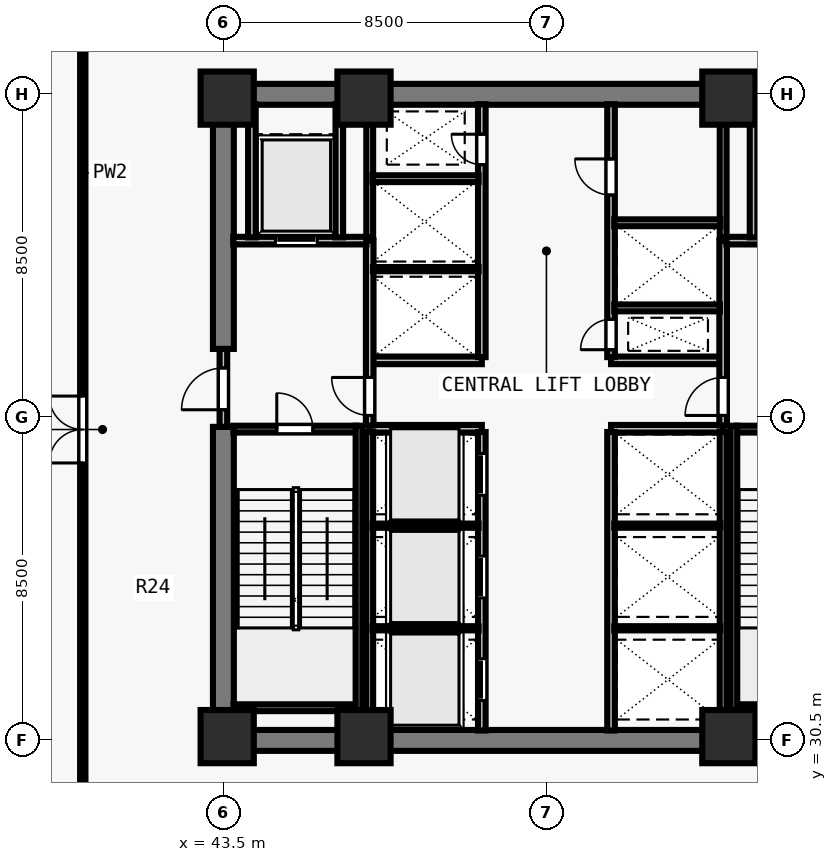
"""IFC4 building model, lengths in metres.
Left out: names, types, materials, properties, quantities, classifications, styles, units other than length and angle.
Written with IfcOpenShell. Run it as: python <this file> out.ifc"""

import sys

from ifc_helpers import new_model, si_unit, direction, frame, frame_2d, origin, origin_2d, place, context, subcontext, project, spatial, rectangle, extrude, element, fill, save


model = new_model("IFC4")
c1 = context("Model", 3, precision=1e-05, world=origin(), true_north=direction((0.0, 1.0)))
c2 = subcontext(c1, "Body", "Model", "MODEL_VIEW")
j1 = project(units=[si_unit("LENGTHUNIT", "METRE"), si_unit("PLANEANGLEUNIT", "RADIAN")], contexts=[c1])
p1 = place(None, origin())
s1 = spatial("IfcSite", under=j1, at=p1, CompositionType="ELEMENT")
p2 = place(p1, origin())
s2 = spatial("IfcBuilding", under=s1, at=p2, CompositionType="ELEMENT")
p3 = place(p2, frame((0.0, 0.0, 5.0)))
s3 = spatial("IfcBuildingStorey", under=s2, at=p3, CompositionType="ELEMENT", Elevation=5.0)
for number, where, z_axis, x_axis in (
    (1, (43.6, 30.6, 0.0), (0.0, 0.0, 1.0), (1.0, 0.0, 0.0)),
    (2, (47.2, 30.6, 0.0), (0.0, 0.0, 1.0), (1.0, 0.0, 0.0)),
    (3, (56.8, 30.6, 0.0), (0.0, 0.0, 1.0), (1.0, 0.0, 0.0)),
    (4, (43.6, 47.4, 0.0), (0.0, 0.0, 1.0), (1.0, 0.0, 0.0)),
    (5, (47.2, 47.4, 0.0), (0.0, 0.0, 1.0), (1.0, 0.0, 0.0)),
    (6, (56.8, 47.4, 0.0), (0.0, 0.0, 1.0), (1.0, 0.0, 0.0)),
):
    element("IfcColumn", number, at=place(p3, frame(where, z_axis=z_axis, x_axis=x_axis)), inside=s3, PredefinedType="COLUMN", context=c2, shape_type="SweptSolid", body=[
        extrude(rectangle(XDim=1.4, YDim=1.4, at=origin_2d()), origin(), (0.0, 0.0, 1.0), 5.0),
    ])
for number, where, z_axis, x_axis in (
    (7, (43.225, 30.5, 0.0), (0.0, 0.0, 1.0), (1.0, 0.0, 0.0)),
    (8, (43.225, 47.5, 0.0), (0.0, 0.0, 1.0), (1.0, 0.0, 0.0)),
):
    element("IfcWall", number, at=place(p3, frame(where, z_axis=z_axis, x_axis=x_axis)), inside=s3, PredefinedType="SHEAR", context=c2, shape_type="SweptSolid", body=[
        extrude(rectangle(XDim=17.55, YDim=0.55, at=frame_2d((8.775, 0.0))), origin(), (0.0, 0.0, 1.0), 4.72),
    ])
p4 = place(p3, frame((43.5, 30.765, 0.0), z_axis=(0.0, 0.0, 1.0), x_axis=(0.0, 1.0, 0.0)))
e9 = element("IfcWall", 9, at=p4, inside=s3, PredefinedType="SHEAR", context=c2, shape_type="SweptSolid", body=[
    extrude(rectangle(XDim=7.985, YDim=0.55, at=frame_2d((3.993, 0.0))), origin(), (0.0, 0.0, 1.0), 4.72),
])
p5 = place(p3, frame((43.5, 40.8, 0.0), z_axis=(0.0, 0.0, 1.0), x_axis=(0.0, 1.0, 0.0)))
e10 = element("IfcWall", 10, at=p5, inside=s3, PredefinedType="SHEAR", context=c2, shape_type="SweptSolid", body=[
    extrude(rectangle(XDim=6.435, YDim=0.55, at=frame_2d((3.218, 0.0))), origin(), (0.0, 0.0, 1.0), 4.72),
])
for number, where, z_axis, x_axis in (
    (11, (47.35, 38.7, 0.0), (0.0, 0.0, 1.0), (1.0, 0.0, 0.0)),
    (12, (47.35, 40.5, 0.0), (0.0, 0.0, 1.0), (1.0, 0.0, 0.0)),
    (13, (53.7, 38.7, 0.0), (0.0, 0.0, 1.0), (1.0, 0.0, 0.0)),
    (14, (53.7, 40.5, 0.0), (0.0, 0.0, 1.0), (1.0, 0.0, 0.0)),
):
    element("IfcWall", number, at=place(p3, frame(where, z_axis=z_axis, x_axis=x_axis)), inside=s3, PredefinedType="SOLIDWALL", context=c2, shape_type="SweptSolid", body=[
        extrude(rectangle(XDim=2.95, YDim=0.2, at=frame_2d((1.475, 0.0))), origin(), (0.0, 0.0, 1.0), 4.72),
    ])
p6 = place(p3, frame((50.3, 30.76, 0.0), z_axis=(0.0, 0.0, 1.0), x_axis=(0.0, 1.0, 0.0)))
e15 = element("IfcWall", 15, at=p6, inside=s3, PredefinedType="SOLIDWALL", context=c2, shape_type="SweptSolid", body=[
    extrude(rectangle(XDim=7.855, YDim=0.2, at=frame_2d((3.927, 0.0))), origin(), (0.0, 0.0, 1.0), 4.72),
])
p7 = place(p6, frame((0.79, 0.0, 0.0)))
e16 = element("IfcOpeningElement", 16, at=p7, cuts=e15, PredefinedType="OPENING", context=c2, shape_type="SweptSolid", body=[
    extrude(rectangle(XDim=1.1, YDim=2.2, at=frame_2d((0.55, 1.1))), frame((0.0, 0.11, 0.0), z_axis=(0.0, -1.0, 0.0), x_axis=(1.0, 0.0, 0.0)), (0.0, 0.0, 1.0), 0.22),
])
p8 = place(p6, frame((3.49, 0.0, 0.0)))
e17 = element("IfcOpeningElement", 17, at=p8, cuts=e15, PredefinedType="OPENING", context=c2, shape_type="SweptSolid", body=[
    extrude(rectangle(XDim=1.1, YDim=2.2, at=frame_2d((0.55, 1.1))), frame((0.0, 0.11, 0.0), z_axis=(0.0, -1.0, 0.0), x_axis=(1.0, 0.0, 0.0)), (0.0, 0.0, 1.0), 0.22),
])
p9 = place(p6, frame((6.19, 0.0, 0.0)))
e18 = element("IfcOpeningElement", 18, at=p9, cuts=e15, PredefinedType="OPENING", context=c2, shape_type="SweptSolid", body=[
    extrude(rectangle(XDim=1.1, YDim=2.2, at=frame_2d((0.55, 1.1))), frame((0.0, 0.11, 0.0), z_axis=(0.0, -1.0, 0.0), x_axis=(1.0, 0.0, 0.0)), (0.0, 0.0, 1.0), 0.22),
])
p10 = place(p3, frame((53.7, 30.76, 0.0), z_axis=(0.0, 0.0, 1.0), x_axis=(0.0, 1.0, 0.0)))
e19 = element("IfcWall", 19, at=p10, inside=s3, PredefinedType="SOLIDWALL", context=c2, shape_type="SweptSolid", body=[
    extrude(rectangle(XDim=7.855, YDim=0.2, at=frame_2d((3.927, 0.0))), origin(), (0.0, 0.0, 1.0), 4.72),
])
p11 = place(p3, frame((50.3, 40.585, 0.0), z_axis=(0.0, 0.0, 1.0), x_axis=(0.0, 1.0, 0.0)))
e20 = element("IfcWall", 20, at=p11, inside=s3, PredefinedType="SOLIDWALL", context=c2, shape_type="SweptSolid", body=[
    extrude(rectangle(XDim=6.655, YDim=0.2, at=frame_2d((3.328, 0.0))), origin(), (0.0, 0.0, 1.0), 4.72),
])
p12 = place(p11, frame((5.065, 0.0, 0.0)))
e21 = element("IfcOpeningElement", 21, at=p12, cuts=e20, PredefinedType="OPENING", context=c2, shape_type="SweptSolid", body=[
    extrude(rectangle(XDim=0.8, YDim=2.08, at=frame_2d((0.4, 1.04))), frame((0.0, 0.11, 0.0), z_axis=(0.0, -1.0, 0.0), x_axis=(1.0, 0.0, 0.0)), (0.0, 0.0, 1.0), 0.22),
])
p13 = place(p3, frame((53.7, 40.585, 0.0), z_axis=(0.0, 0.0, 1.0), x_axis=(0.0, 1.0, 0.0)))
e22 = element("IfcWall", 22, at=p13, inside=s3, PredefinedType="SOLIDWALL", context=c2, shape_type="SweptSolid", body=[
    extrude(rectangle(XDim=6.655, YDim=0.2, at=frame_2d((3.328, 0.0))), origin(), (0.0, 0.0, 1.0), 4.72),
])
p14 = place(p13, frame((0.195, 0.0, 0.0)))
e23 = element("IfcOpeningElement", 23, at=p14, cuts=e22, PredefinedType="OPENING", context=c2, shape_type="SweptSolid", body=[
    extrude(rectangle(XDim=0.8, YDim=2.08, at=frame_2d((0.4, 1.04))), frame((0.0, 0.11, 0.0), z_axis=(0.0, -1.0, 0.0), x_axis=(1.0, 0.0, 0.0)), (0.0, 0.0, 1.0), 0.22),
])
p15 = place(p13, frame((4.265, 0.0, 0.0)))
e24 = element("IfcOpeningElement", 24, at=p15, cuts=e22, PredefinedType="OPENING", context=c2, shape_type="SweptSolid", body=[
    extrude(rectangle(XDim=0.95, YDim=2.12, at=frame_2d((0.475, 1.06))), frame((0.0, 0.11, 0.0), z_axis=(0.0, -1.0, 0.0), x_axis=(1.0, 0.0, 0.0)), (0.0, 0.0, 1.0), 0.22),
])
p16 = place(p3, frame((43.5, 38.75, 0.0), z_axis=(0.0, 0.0, 1.0), x_axis=(0.0, 1.0, 0.0)))
e25 = element("IfcWall", 25, at=p16, inside=s3, PredefinedType="SOLIDWALL", context=c2, shape_type="SweptSolid", body=[
    extrude(rectangle(XDim=2.05, YDim=0.2, at=frame_2d((1.025, 0.0))), origin(), (0.0, 0.0, 1.0), 4.72),
])
p17 = place(p16, frame((0.45, 0.0, 0.0)))
e26 = element("IfcOpeningElement", 26, at=p17, cuts=e25, PredefinedType="OPENING", context=c2, shape_type="SweptSolid", body=[
    extrude(rectangle(XDim=1.1, YDim=2.15, at=frame_2d((0.55, 1.075))), frame((0.0, 0.11, 0.0), z_axis=(0.0, -1.0, 0.0), x_axis=(1.0, 0.0, 0.0)), (0.0, 0.0, 1.0), 0.22),
])
p18 = place(p3, frame((47.35, 38.785, 0.0), z_axis=(0.0, 0.0, 1.0), x_axis=(0.0, 1.0, 0.0)))
e27 = element("IfcWall", 27, at=p18, inside=s3, PredefinedType="SOLIDWALL", context=c2, shape_type="SweptSolid", body=[
    extrude(rectangle(XDim=4.865, YDim=0.2, at=frame_2d((2.433, 0.0))), origin(), (0.0, 0.0, 1.0), 4.72),
])
p19 = place(p18, frame((0.265, 0.0, 0.0)))
e28 = element("IfcOpeningElement", 28, at=p19, cuts=e27, PredefinedType="OPENING", context=c2, shape_type="SweptSolid", body=[
    extrude(rectangle(XDim=1.0, YDim=2.15, at=frame_2d((0.5, 1.075))), frame((0.0, 0.11, 0.0), z_axis=(0.0, -1.0, 0.0), x_axis=(1.0, 0.0, 0.0)), (0.0, 0.0, 1.0), 0.22),
])
p20 = place(p3, frame((43.76, 43.65, 0.0), z_axis=(0.0, 0.0, 1.0), x_axis=(1.0, 0.0, 0.0)))
e29 = element("IfcWall", 29, at=p20, inside=s3, PredefinedType="SOLIDWALL", context=c2, shape_type="SweptSolid", body=[
    extrude(rectangle(XDim=3.505, YDim=0.2, at=frame_2d((1.752, 0.0))), origin(), (0.0, 0.0, 1.0), 4.72),
])
p21 = place(p20, frame((1.11, 0.0, 0.0)))
e30 = element("IfcOpeningElement", 30, at=p21, cuts=e29, PredefinedType="OPENING", context=c2, shape_type="SweptSolid", body=[
    extrude(rectangle(XDim=1.1, YDim=2.2, at=frame_2d((0.55, 1.1))), frame((0.0, 0.11, 0.0), z_axis=(0.0, -1.0, 0.0), x_axis=(1.0, 0.0, 0.0)), (0.0, 0.0, 1.0), 0.22),
])
for number, where, z_axis, x_axis in (
    (31, (46.55, 43.735, 0.0), (0.0, 0.0, 1.0), (0.0, 1.0, 0.0)),
    (32, (44.25, 43.735, 0.0), (0.0, 0.0, 1.0), (0.0, 1.0, 0.0)),
):
    element("IfcWall", number, at=place(p3, frame(where, z_axis=z_axis, x_axis=x_axis)), inside=s3, PredefinedType="SOLIDWALL", context=c2, shape_type="SweptSolid", body=[
        extrude(rectangle(XDim=3.505, YDim=0.2, at=frame_2d((1.752, 0.0))), origin(), (0.0, 0.0, 1.0), 4.72),
    ])
p22 = place(p3, frame((56.65, 38.785, 0.0), z_axis=(0.0, 0.0, 1.0), x_axis=(0.0, 1.0, 0.0)))
e33 = element("IfcWall", 33, at=p22, inside=s3, PredefinedType="SOLIDWALL", context=c2, shape_type="SweptSolid", body=[
    extrude(rectangle(XDim=4.865, YDim=0.2, at=frame_2d((2.433, 0.0))), origin(), (0.0, 0.0, 1.0), 4.72),
])
p23 = place(p22, frame((0.265, 0.0, 0.0)))
e34 = element("IfcOpeningElement", 34, at=p23, cuts=e33, PredefinedType="OPENING", context=c2, shape_type="SweptSolid", body=[
    extrude(rectangle(XDim=1.0, YDim=2.15, at=frame_2d((0.5, 1.075))), frame((0.0, 0.11, 0.0), z_axis=(0.0, -1.0, 0.0), x_axis=(1.0, 0.0, 0.0)), (0.0, 0.0, 1.0), 0.22),
])
p24 = place(p3, frame((56.735, 43.65, 0.0), z_axis=(0.0, 0.0, 1.0), x_axis=(1.0, 0.0, 0.0)))
e35 = element("IfcWall", 35, at=p24, inside=s3, PredefinedType="SOLIDWALL", context=c2, shape_type="SweptSolid", body=[
    extrude(rectangle(XDim=3.505, YDim=0.2, at=frame_2d((1.752, 0.0))), origin(), (0.0, 0.0, 1.0), 4.72),
])
p25 = place(p24, frame((1.295, 0.0, 0.0)))
e36 = element("IfcOpeningElement", 36, at=p25, cuts=e35, PredefinedType="OPENING", context=c2, shape_type="SweptSolid", body=[
    extrude(rectangle(XDim=1.1, YDim=2.2, at=frame_2d((0.55, 1.1))), frame((0.0, 0.11, 0.0), z_axis=(0.0, -1.0, 0.0), x_axis=(1.0, 0.0, 0.0)), (0.0, 0.0, 1.0), 0.22),
])
p26 = place(p3, frame((57.45, 43.735, 0.0), z_axis=(0.0, 0.0, 1.0), x_axis=(0.0, 1.0, 0.0)))
e37 = element("IfcWall", 37, at=p26, inside=s3, PredefinedType="SOLIDWALL", context=c2, shape_type="SweptSolid", body=[
    extrude(rectangle(XDim=3.505, YDim=0.2, at=frame_2d((1.752, 0.0))), origin(), (0.0, 0.0, 1.0), 4.72),
])
p27 = place(p3, frame((47.35, 30.76, 0.0), z_axis=(0.0, 0.0, 1.0), x_axis=(0.0, 1.0, 0.0)))
e38 = element("IfcWall", 38, at=p27, inside=s3, PredefinedType="SOLIDWALL", context=c2, shape_type="SweptSolid", body=[
    extrude(rectangle(XDim=7.855, YDim=0.18, at=frame_2d((3.927, 0.0))), origin(), (0.0, 0.0, 1.0), 4.72),
])
for number, where, z_axis, x_axis in (
    (39, (47.425, 33.45, 0.0), (0.0, 0.0, 1.0), (1.0, 0.0, 0.0)),
    (40, (47.425, 36.15, 0.0), (0.0, 0.0, 1.0), (1.0, 0.0, 0.0)),
):
    element("IfcWall", number, at=place(p3, frame(where, z_axis=z_axis, x_axis=x_axis)), inside=s3, PredefinedType="PARTITIONING", context=c2, shape_type="SweptSolid", body=[
        extrude(rectangle(XDim=2.79, YDim=0.11, at=frame_2d((1.395, 0.0))), origin(), (0.0, 0.0, 1.0), 4.72),
    ])
p28 = place(p3, frame((56.65, 30.76, 0.0), z_axis=(0.0, 0.0, 1.0), x_axis=(0.0, 1.0, 0.0)))
e41 = element("IfcWall", 41, at=p28, inside=s3, PredefinedType="SOLIDWALL", context=c2, shape_type="SweptSolid", body=[
    extrude(rectangle(XDim=7.855, YDim=0.18, at=frame_2d((3.927, 0.0))), origin(), (0.0, 0.0, 1.0), 4.72),
])
for number, where, z_axis, x_axis in (
    (42, (53.785, 33.45, 0.0), (0.0, 0.0, 1.0), (1.0, 0.0, 0.0)),
    (43, (53.785, 36.15, 0.0), (0.0, 0.0, 1.0), (1.0, 0.0, 0.0)),
):
    element("IfcWall", number, at=place(p3, frame(where, z_axis=z_axis, x_axis=x_axis)), inside=s3, PredefinedType="PARTITIONING", context=c2, shape_type="SweptSolid", body=[
        extrude(rectangle(XDim=2.79, YDim=0.11, at=frame_2d((1.395, 0.0))), origin(), (0.0, 0.0, 1.0), 4.72),
    ])
p29 = place(p3, frame((47.35, 43.735, 0.0), z_axis=(0.0, 0.0, 1.0), x_axis=(0.0, 1.0, 0.0)))
e44 = element("IfcWall", 44, at=p29, inside=s3, PredefinedType="SOLIDWALL", context=c2, shape_type="SweptSolid", body=[
    extrude(rectangle(XDim=3.505, YDim=0.18, at=frame_2d((1.752, 0.0))), origin(), (0.0, 0.0, 1.0), 4.72),
])
p30 = place(p3, frame((47.435, 42.9, 0.0), z_axis=(0.0, 0.0, 1.0), x_axis=(1.0, 0.0, 0.0)))
e45 = element("IfcWall", 45, at=p30, inside=s3, PredefinedType="PARTITIONING", context=c2, shape_type="SweptSolid", body=[
    extrude(rectangle(XDim=2.78, YDim=0.11, at=frame_2d((1.39, 0.0))), origin(), (0.0, 0.0, 1.0), 4.72),
])
p31 = place(p3, frame((47.425, 45.28, 0.0), z_axis=(0.0, 0.0, 1.0), x_axis=(1.0, 0.0, 0.0)))
e46 = element("IfcWall", 46, at=p31, inside=s3, PredefinedType="SOLIDWALL", context=c2, shape_type="SweptSolid", body=[
    extrude(rectangle(XDim=2.79, YDim=0.18, at=frame_2d((1.395, 0.0))), origin(), (0.0, 0.0, 1.0), 4.72),
])
p32 = place(p3, frame((56.65, 43.735, 0.0), z_axis=(0.0, 0.0, 1.0), x_axis=(0.0, 1.0, 0.0)))
e47 = element("IfcWall", 47, at=p32, inside=s3, PredefinedType="SOLIDWALL", context=c2, shape_type="SweptSolid", body=[
    extrude(rectangle(XDim=3.505, YDim=0.18, at=frame_2d((1.752, 0.0))), origin(), (0.0, 0.0, 1.0), 4.72),
])
p33 = place(p3, frame((53.785, 41.88, 0.0), z_axis=(0.0, 0.0, 1.0), x_axis=(1.0, 0.0, 0.0)))
e48 = element("IfcWall", 48, at=p33, inside=s3, PredefinedType="SOLIDWALL", context=c2, shape_type="SweptSolid", body=[
    extrude(rectangle(XDim=2.78, YDim=0.18, at=frame_2d((1.39, 0.0))), origin(), (0.0, 0.0, 1.0), 4.72),
])
p34 = place(p3, frame((53.785, 44.12, 0.0), z_axis=(0.0, 0.0, 1.0), x_axis=(1.0, 0.0, 0.0)))
e49 = element("IfcWall", 49, at=p34, inside=s3, PredefinedType="SOLIDWALL", context=c2, shape_type="SweptSolid", body=[
    extrude(rectangle(XDim=2.79, YDim=0.18, at=frame_2d((1.395, 0.0))), origin(), (0.0, 0.0, 1.0), 4.72),
])
p35 = place(p3, frame((39.8, 26.855, 0.0), z_axis=(0.0, 0.0, 1.0), x_axis=(0.0, 1.0, 0.0)))
e50 = element("IfcWall", 50, at=p35, inside=s3, PredefinedType="PARTITIONING", context=c2, shape_type="SweptSolid", body=[
    extrude(rectangle(XDim=24.29, YDim=0.14, at=frame_2d((12.145, 0.0))), origin(), (0.0, 0.0, 1.0), 4.72),
])
p36 = place(p35, frame((10.945, 0.0, 0.0)))
e51 = element("IfcOpeningElement", 51, at=p36, cuts=e50, PredefinedType="OPENING", context=c2, shape_type="SweptSolid", body=[
    extrude(rectangle(XDim=1.76, YDim=2.2, at=frame_2d((0.88, 1.1))), frame((0.0, 0.08, 0.0), z_axis=(0.0, -1.0, 0.0), x_axis=(1.0, 0.0, 0.0)), (0.0, 0.0, 1.0), 0.16),
])
p37 = place(p3, frame((43.765, 38.69, 0.0), z_axis=(0.0, 0.0, 1.0), x_axis=(1.0, 0.0, 0.0)))
e52 = element("IfcWall", 52, at=p37, inside=s3, PredefinedType="SOLIDWALL", context=c2, shape_type="SweptSolid", body=[
    extrude(rectangle(XDim=3.23, YDim=0.18, at=frame_2d((1.615, 0.0))), origin(), (0.0, 0.0, 1.0), 4.72),
])
p38 = place(p37, frame((1.14, 0.0, 0.0)))
e53 = element("IfcOpeningElement", 53, at=p38, cuts=e52, PredefinedType="OPENING", context=c2, shape_type="SweptSolid", body=[
    extrude(rectangle(XDim=0.95, YDim=2.15, at=frame_2d((0.475, 1.075))), frame((0.0, 0.1, 0.0), z_axis=(0.0, -1.0, 0.0), x_axis=(1.0, 0.0, 0.0)), (0.0, 0.0, 1.0), 0.2),
])
p39 = place(p3, frame((43.765, 31.36, 0.0), z_axis=(0.0, 0.0, 1.0), x_axis=(1.0, 0.0, 0.0)))
e54 = element("IfcWall", 54, at=p39, inside=s3, PredefinedType="SOLIDWALL", context=c2, shape_type="SweptSolid", body=[
    extrude(rectangle(XDim=3.23, YDim=0.18, at=frame_2d((1.615, 0.0))), origin(), (0.0, 0.0, 1.0), 4.72),
])
p40 = place(p3, frame((47.07, 38.78, 0.0), z_axis=(0.0, 0.0, 1.0), x_axis=(0.0, -1.0, 0.0)))
e55 = element("IfcWall", 55, at=p40, inside=s3, PredefinedType="SOLIDWALL", context=c2, shape_type="SweptSolid", body=[
    extrude(rectangle(XDim=8.017, YDim=0.18, at=frame_2d((4.009, 0.0))), origin(), (0.0, 0.0, 1.0), 4.72),
])
p41 = place(p3, frame((57.005, 38.69, 0.0), z_axis=(0.0, 0.0, 1.0), x_axis=(1.0, 0.0, 0.0)))
e56 = element("IfcWall", 56, at=p41, inside=s3, PredefinedType="SOLIDWALL", context=c2, shape_type="SweptSolid", body=[
    extrude(rectangle(XDim=3.23, YDim=0.18, at=frame_2d((1.615, 0.0))), origin(), (0.0, 0.0, 1.0), 4.72),
])
p42 = place(p41, frame((1.14, 0.0, 0.0)))
e57 = element("IfcOpeningElement", 57, at=p42, cuts=e56, PredefinedType="OPENING", context=c2, shape_type="SweptSolid", body=[
    extrude(rectangle(XDim=0.95, YDim=2.15, at=frame_2d((0.475, 1.075))), frame((0.0, 0.1, 0.0), z_axis=(0.0, -1.0, 0.0), x_axis=(1.0, 0.0, 0.0)), (0.0, 0.0, 1.0), 0.2),
])
p43 = place(p3, frame((57.005, 31.36, 0.0), z_axis=(0.0, 0.0, 1.0), x_axis=(1.0, 0.0, 0.0)))
e58 = element("IfcWall", 58, at=p43, inside=s3, PredefinedType="SOLIDWALL", context=c2, shape_type="SweptSolid", body=[
    extrude(rectangle(XDim=3.23, YDim=0.18, at=frame_2d((1.615, 0.0))), origin(), (0.0, 0.0, 1.0), 4.72),
])
p44 = place(p3, frame((56.93, 38.78, 0.0), z_axis=(0.0, 0.0, 1.0), x_axis=(0.0, -1.0, 0.0)))
e59 = element("IfcWall", 59, at=p44, inside=s3, PredefinedType="SOLIDWALL", context=c2, shape_type="SweptSolid", body=[
    extrude(rectangle(XDim=8.017, YDim=0.18, at=frame_2d((4.009, 0.0))), origin(), (0.0, 0.0, 1.0), 4.72),
])
p45 = place(p17, origin())
e60 = element("IfcDoor", 60, at=p45, inside=s3, OperationType="SINGLE_SWING_LEFT", PredefinedType="DOOR", context=c2, shape_type="SweptSolid", body=[
    extrude(rectangle(XDim=1.1, YDim=2.15, at=frame_2d((0.55, 1.075))), frame((0.0, 0.025, 0.0), z_axis=(0.0, -1.0, 0.0), x_axis=(1.0, 0.0, 0.0)), (0.0, 0.0, 1.0), 0.05),
])
fill(e26, e60)
p46 = place(p19, origin())
e61 = element("IfcDoor", 61, at=p46, inside=s3, OperationType="SINGLE_SWING_RIGHT", PredefinedType="DOOR", context=c2, shape_type="SweptSolid", body=[
    extrude(rectangle(XDim=1.0, YDim=2.15, at=frame_2d((0.5, 1.075))), frame((0.0, 0.025, 0.0), z_axis=(0.0, -1.0, 0.0), x_axis=(1.0, 0.0, 0.0)), (0.0, 0.0, 1.0), 0.05),
])
fill(e28, e61)
p47 = place(p21, origin())
e62 = element("IfcDoor", 62, at=p47, inside=s3, OperationType="SLIDING_TO_LEFT", PredefinedType="DOOR", context=c2, shape_type="SweptSolid", body=[
    extrude(rectangle(XDim=1.1, YDim=2.2, at=frame_2d((0.55, 1.1))), frame((0.0, 0.025, 0.0), z_axis=(0.0, -1.0, 0.0), x_axis=(1.0, 0.0, 0.0)), (0.0, 0.0, 1.0), 0.05),
])
fill(e30, e62)
p48 = place(p23, origin())
e63 = element("IfcDoor", 63, at=p48, inside=s3, OperationType="SINGLE_SWING_LEFT", PredefinedType="DOOR", context=c2, shape_type="SweptSolid", body=[
    extrude(rectangle(XDim=1.0, YDim=2.15, at=frame_2d((0.5, 1.075))), frame((0.0, 0.025, 0.0), z_axis=(0.0, -1.0, 0.0), x_axis=(1.0, 0.0, 0.0)), (0.0, 0.0, 1.0), 0.05),
])
fill(e34, e63)
p49 = place(p7, origin())
e64 = element("IfcDoor", 64, at=p49, inside=s3, OperationType="SLIDING_TO_LEFT", PredefinedType="DOOR", context=c2, shape_type="SweptSolid", body=[
    extrude(rectangle(XDim=1.1, YDim=2.2, at=frame_2d((0.55, 1.1))), frame((0.0, 0.025, 0.0), z_axis=(0.0, -1.0, 0.0), x_axis=(1.0, 0.0, 0.0)), (0.0, 0.0, 1.0), 0.05),
])
fill(e16, e64)
p50 = place(p8, origin())
e65 = element("IfcDoor", 65, at=p50, inside=s3, OperationType="SLIDING_TO_LEFT", PredefinedType="DOOR", context=c2, shape_type="SweptSolid", body=[
    extrude(rectangle(XDim=1.1, YDim=2.2, at=frame_2d((0.55, 1.1))), frame((0.0, 0.025, 0.0), z_axis=(0.0, -1.0, 0.0), x_axis=(1.0, 0.0, 0.0)), (0.0, 0.0, 1.0), 0.05),
])
fill(e17, e65)
p51 = place(p9, origin())
e66 = element("IfcDoor", 66, at=p51, inside=s3, OperationType="SLIDING_TO_LEFT", PredefinedType="DOOR", context=c2, shape_type="SweptSolid", body=[
    extrude(rectangle(XDim=1.1, YDim=2.2, at=frame_2d((0.55, 1.1))), frame((0.0, 0.025, 0.0), z_axis=(0.0, -1.0, 0.0), x_axis=(1.0, 0.0, 0.0)), (0.0, 0.0, 1.0), 0.05),
])
fill(e18, e66)
p52 = place(p12, origin())
e67 = element("IfcDoor", 67, at=p52, inside=s3, OperationType="SINGLE_SWING_RIGHT", PredefinedType="DOOR", context=c2, shape_type="SweptSolid", body=[
    extrude(rectangle(XDim=0.8, YDim=2.08, at=frame_2d((0.4, 1.04))), frame((0.0, 0.025, 0.0), z_axis=(0.0, -1.0, 0.0), x_axis=(1.0, 0.0, 0.0)), (0.0, 0.0, 1.0), 0.05),
])
fill(e21, e67)
p53 = place(p14, origin())
e68 = element("IfcDoor", 68, at=p53, inside=s3, OperationType="SINGLE_SWING_LEFT", PredefinedType="DOOR", context=c2, shape_type="SweptSolid", body=[
    extrude(rectangle(XDim=0.8, YDim=2.08, at=frame_2d((0.4, 1.04))), frame((0.0, 0.025, 0.0), z_axis=(0.0, -1.0, 0.0), x_axis=(1.0, 0.0, 0.0)), (0.0, 0.0, 1.0), 0.05),
])
fill(e23, e68)
p54 = place(p15, origin())
e69 = element("IfcDoor", 69, at=p54, inside=s3, OperationType="SINGLE_SWING_RIGHT", PredefinedType="DOOR", context=c2, shape_type="SweptSolid", body=[
    extrude(rectangle(XDim=0.95, YDim=2.12, at=frame_2d((0.475, 1.06))), frame((0.0, 0.025, 0.0), z_axis=(0.0, -1.0, 0.0), x_axis=(1.0, 0.0, 0.0)), (0.0, 0.0, 1.0), 0.05),
])
fill(e24, e69)
p55 = place(p36, origin())
e70 = element("IfcDoor", 70, at=p55, inside=s3, OperationType="DOUBLE_DOOR_SINGLE_SWING", PredefinedType="DOOR", context=c2, shape_type="SweptSolid", body=[
    extrude(rectangle(XDim=1.76, YDim=2.2, at=frame_2d((0.88, 1.1))), frame((0.0, 0.025, 0.0), z_axis=(0.0, -1.0, 0.0), x_axis=(1.0, 0.0, 0.0)), (0.0, 0.0, 1.0), 0.05),
])
fill(e51, e70)
p56 = place(p38, origin())
e71 = element("IfcDoor", 71, at=p56, inside=s3, OperationType="SINGLE_SWING_LEFT", PredefinedType="DOOR", context=c2, shape_type="SweptSolid", body=[
    extrude(rectangle(XDim=0.95, YDim=2.15, at=frame_2d((0.475, 1.075))), frame((0.0, 0.025, 0.0), z_axis=(0.0, -1.0, 0.0), x_axis=(1.0, 0.0, 0.0)), (0.0, 0.0, 1.0), 0.05),
])
fill(e53, e71)
save(model, sys.argv[1])
